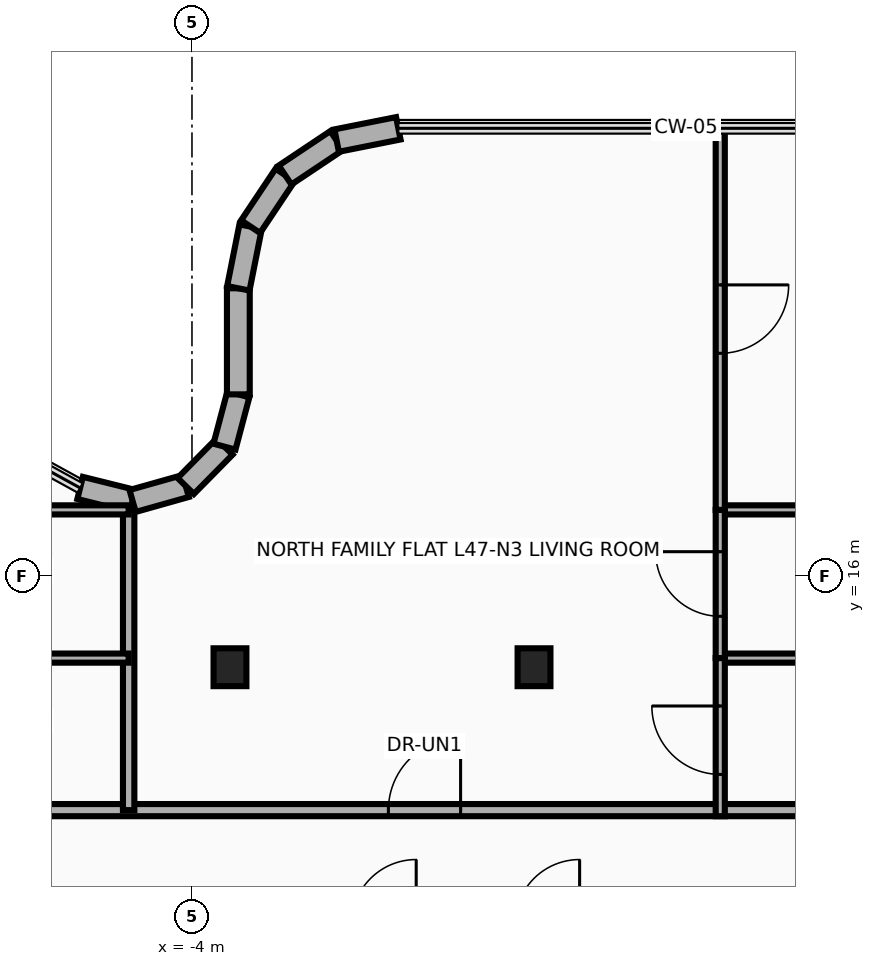
"""IFC4 building model, lengths in metres.
Left out: names, types, materials, properties, quantities, classifications, styles, units other than length and angle.
Written with IfcOpenShell. Run it as: python <this file> out.ifc"""

import sys

from ifc_helpers import new_model, si_unit, direction, frame, frame_2d, origin, origin_2d, place, context, subcontext, project, spatial, rectangle, i_section, extrude, source, transform, mapped, element, fill, save


model = new_model("IFC4")
c1 = context("Model", 3, precision=1e-05, world=origin(), true_north=direction((0.0, 1.0)))
c2 = subcontext(c1, "Body", "Model", "MODEL_VIEW")
j1 = project(units=[si_unit("LENGTHUNIT", "METRE"), si_unit("PLANEANGLEUNIT", "RADIAN")], contexts=[c1])
p1 = place(None, origin())
s1 = spatial("IfcSite", under=j1, at=p1, CompositionType="ELEMENT")
p2 = place(p1, origin())
s2 = spatial("IfcBuilding", under=s1, at=p2, CompositionType="ELEMENT")
p3 = place(p2, frame((0.0, 0.0, 184.45)))
s3 = spatial("IfcBuildingStorey", under=s2, at=p3, CompositionType="ELEMENT", Elevation=184.45)
m1 = source(origin(), c2, "Body", "SweptSolid", [
    extrude(i_section(OverallWidth=0.432, OverallDepth=0.498, WebThickness=0.056, FlangeThickness=0.089, at=origin_2d()), origin(), (0.0, 0.0, 1.0), 3.95),
])
for number, where, z_axis, x_axis in (
    (1, (-3.5, 14.8, 0.0), (0.0, 0.0, 1.0), (1.0, 0.0, 0.0)),
    (2, (0.5, 14.8, 0.0), (0.0, 0.0, 1.0), (1.0, 0.0, 0.0)),
):
    element("IfcColumn", number, at=place(p3, frame(where, z_axis=z_axis, x_axis=x_axis)), inside=s3, PredefinedType="COLUMN", context=c2, shape_type="MappedRepresentation", body=[
        mapped(m1, transform((0.0, 0.0, 0.0), x_axis=(1.0, 0.0, 0.0), y_axis=(0.0, 1.0, 0.0), z_axis=(0.0, 0.0, 1.0), scale=1.0)),
    ])
p4 = place(p3, frame((-5.472, 17.159, 0.0), z_axis=(0.0, 0.0, 1.0), x_axis=(0.970564820059, -0.240840050789, 0.0)))
e3 = element("IfcWall", 3, at=p4, inside=s3, PredefinedType="SOLIDWALL", context=c2, shape_type="SweptSolid", body=[
    extrude(rectangle(XDim=0.712, YDim=0.3, at=frame_2d((0.356, 0.0))), origin(), (0.0, 0.0, 1.0), 3.63),
])
p5 = place(p3, frame((-4.781, 16.987, 0.0), z_axis=(0.0, 0.0, 1.0), x_axis=(0.962494705656, 0.271300463662, 0.0)))
e4 = element("IfcWall", 4, at=p5, inside=s3, PredefinedType="SOLIDWALL", context=c2, shape_type="SweptSolid", body=[
    extrude(rectangle(XDim=0.726, YDim=0.3, at=frame_2d((0.363, 0.0))), origin(), (0.0, 0.0, 1.0), 3.63),
])
p6 = place(p3, frame((-4.082, 17.184, 0.0), z_axis=(0.0, 0.0, 1.0), x_axis=(0.701538604215, 0.712631452293, 0.0)))
e5 = element("IfcWall", 5, at=p6, inside=s3, PredefinedType="SOLIDWALL", context=c2, shape_type="SweptSolid", body=[
    extrude(rectangle(XDim=0.726, YDim=0.3, at=frame_2d((0.363, 0.0))), origin(), (0.0, 0.0, 1.0), 2.615),
])
p7 = place(p3, frame((-3.573, 17.702, 0.0), z_axis=(0.0, 0.0, 1.0), x_axis=(0.256637481794, 0.966507735581, 0.0)))
e6 = element("IfcWall", 6, at=p7, inside=s3, PredefinedType="SOLIDWALL", context=c2, shape_type="SweptSolid", body=[
    extrude(rectangle(XDim=0.712, YDim=0.3, at=frame_2d((0.356, 0.0))), origin(), (0.0, 0.0, 1.0), 2.615),
])
p8 = place(p3, frame((-3.39, 18.39, 0.0), z_axis=(0.0, 0.0, 1.0), x_axis=(0.0, 1.0, 0.0)))
e7 = element("IfcWall", 7, at=p8, inside=s3, PredefinedType="SOLIDWALL", context=c2, shape_type="SweptSolid", body=[
    extrude(rectangle(XDim=1.396, YDim=0.3, at=frame_2d((0.698, 0.0))), origin(), (0.0, 0.0, 1.0), 2.615),
])
p9 = place(p3, frame((-3.39, 19.785, 0.0), z_axis=(0.0, 0.0, 1.0), x_axis=(0.195094354541, 0.980784478276, 0.0)))
e8 = element("IfcWall", 8, at=p9, inside=s3, PredefinedType="SOLIDWALL", context=c2, shape_type="SweptSolid", body=[
    extrude(rectangle(XDim=0.827, YDim=0.3, at=frame_2d((0.414, 0.0))), origin(), (0.0, 0.0, 1.0), 2.615),
])
p10 = place(p3, frame((-3.229, 20.596, 0.0), z_axis=(0.0, 0.0, 1.0), x_axis=(0.55545926088, 0.831543750805, 0.0)))
e9 = element("IfcWall", 9, at=p10, inside=s3, PredefinedType="SOLIDWALL", context=c2, shape_type="SweptSolid", body=[
    extrude(rectangle(XDim=0.816, YDim=0.3, at=frame_2d((0.408, 0.0))), origin(), (0.0, 0.0, 1.0), 2.615),
])
p11 = place(p3, frame((-2.775, 21.275, 0.0), z_axis=(0.0, 0.0, 1.0), x_axis=(0.831543750805, 0.55545926088, 0.0)))
e10 = element("IfcWall", 10, at=p11, inside=s3, PredefinedType="SOLIDWALL", context=c2, shape_type="SweptSolid", body=[
    extrude(rectangle(XDim=0.816, YDim=0.3, at=frame_2d((0.408, 0.0))), origin(), (0.0, 0.0, 1.0), 3.63),
])
p12 = place(p3, frame((-2.096, 21.729, 0.0), z_axis=(0.0, 0.0, 1.0), x_axis=(0.980784478276, 0.195094354541, 0.0)))
e11 = element("IfcWall", 11, at=p12, inside=s3, PredefinedType="SOLIDWALL", context=c2, shape_type="SweptSolid", body=[
    extrude(rectangle(XDim=0.827, YDim=0.3, at=frame_2d((0.414, 0.0))), origin(), (0.0, 0.0, 1.0), 3.076),
])
p13 = place(p3, frame((-28.25, 12.92, 0.0), z_axis=(0.0, 0.0, 1.0), x_axis=(1.0, 0.0, 0.0)))
e12 = element("IfcWall", 12, at=p13, inside=s3, PredefinedType="PARTITIONING", context=c2, shape_type="SweptSolid", body=[
    extrude(rectangle(XDim=36.75, YDim=0.16, at=frame_2d((18.375, 0.0))), origin(), (0.0, 0.0, 1.0), 2.615),
])
p14 = place(p13, frame((0.973, 0.0, 0.0)))
e13 = element("IfcOpeningElement", 13, at=p14, cuts=e12, PredefinedType="OPENING", context=c2, shape_type="SweptSolid", body=[
    extrude(rectangle(XDim=0.95, YDim=2.15, at=frame_2d((0.475, 1.075))), frame((0.0, 0.095, 0.0), z_axis=(0.0, -1.0, 0.0), x_axis=(1.0, 0.0, 0.0)), (0.0, 0.0, 1.0), 0.19),
])
p15 = place(p13, frame((4.915, 0.0, 0.0)))
e14 = element("IfcOpeningElement", 14, at=p15, cuts=e12, PredefinedType="OPENING", context=c2, shape_type="SweptSolid", body=[
    extrude(rectangle(XDim=0.95, YDim=2.15, at=frame_2d((0.475, 1.075))), frame((0.0, 0.095, 0.0), z_axis=(0.0, -1.0, 0.0), x_axis=(1.0, 0.0, 0.0)), (0.0, 0.0, 1.0), 0.19),
])
p16 = place(p13, frame((13.5, 0.0, 0.0)))
e15 = element("IfcOpeningElement", 15, at=p16, cuts=e12, PredefinedType="OPENING", context=c2, shape_type="SweptSolid", body=[
    extrude(rectangle(XDim=0.95, YDim=2.15, at=frame_2d((0.475, 1.075))), frame((0.0, 0.095, 0.0), z_axis=(0.0, -1.0, 0.0), x_axis=(1.0, 0.0, 0.0)), (0.0, 0.0, 1.0), 0.19),
])
p17 = place(p13, frame((26.834, 0.0, 0.0)))
e16 = element("IfcOpeningElement", 16, at=p17, cuts=e12, PredefinedType="OPENING", context=c2, shape_type="SweptSolid", body=[
    extrude(rectangle(XDim=0.95, YDim=2.15, at=frame_2d((0.475, 1.075))), frame((0.0, 0.095, 0.0), z_axis=(0.0, -1.0, 0.0), x_axis=(1.0, 0.0, 0.0)), (0.0, 0.0, 1.0), 0.19),
])
p18 = place(p3, frame((-4.833, 12.92, 0.0), z_axis=(0.0, 0.0, 1.0), x_axis=(0.0, 1.0, 0.0)))
e17 = element("IfcWall", 17, at=p18, inside=s3, PredefinedType="PARTITIONING", context=c2, shape_type="SweptSolid", body=[
    extrude(rectangle(XDim=3.951, YDim=0.15, at=frame_2d((1.976, 0.0))), origin(), (0.0, 0.0, 1.0), 2.415),
])
p19 = place(p3, frame((-10.383, 14.92, 0.0), z_axis=(0.0, 0.0, 1.0), x_axis=(1.0, 0.0, 0.0)))
e18 = element("IfcWall", 18, at=p19, inside=s3, PredefinedType="PARTITIONING", context=c2, shape_type="SweptSolid", body=[
    extrude(rectangle(XDim=5.55, YDim=0.12, at=frame_2d((2.775, 0.0))), origin(), (0.0, 0.0, 1.0), 2.415),
])
p20 = place(p3, frame((-10.383, 16.87, 0.0), z_axis=(0.0, 0.0, 1.0), x_axis=(1.0, 0.0, 0.0)))
e19 = element("IfcWall", 19, at=p20, inside=s3, PredefinedType="PARTITIONING", context=c2, shape_type="SweptSolid", body=[
    extrude(rectangle(XDim=5.55, YDim=0.12, at=frame_2d((2.775, 0.0))), origin(), (0.0, 0.0, 1.0), 3.63),
])
for number, where, z_axis, x_axis in (
    (20, (2.95, 14.92, 0.0), (0.0, 0.0, 1.0), (1.0, 0.0, 0.0)),
    (21, (2.95, 16.87, 0.0), (0.0, 0.0, 1.0), (1.0, 0.0, 0.0)),
):
    element("IfcWall", number, at=place(p3, frame(where, z_axis=z_axis, x_axis=x_axis)), inside=s3, PredefinedType="PARTITIONING", context=c2, shape_type="SweptSolid", body=[
        extrude(rectangle(XDim=5.55, YDim=0.12, at=frame_2d((2.775, 0.0))), origin(), (0.0, 0.0, 1.0), 2.615),
    ])
p21 = place(p3, frame((2.95, 14.92, 0.0), z_axis=(0.0, 0.0, 1.0), x_axis=(0.0, 1.0, 0.0)))
e22 = element("IfcWall", 22, at=p21, inside=s3, PredefinedType="PARTITIONING", context=c2, shape_type="SweptSolid", body=[
    extrude(rectangle(XDim=1.95, YDim=0.12, at=frame_2d((0.975, 0.0))), origin(), (0.0, 0.0, 1.0), 2.665),
])
p22 = place(p21, frame((0.55, 0.0, 0.0)))
e23 = element("IfcOpeningElement", 23, at=p22, cuts=e22, PredefinedType="OPENING", context=c2, shape_type="SweptSolid", body=[
    extrude(rectangle(XDim=0.85, YDim=2.1, at=frame_2d((0.425, 1.05))), frame((0.0, 0.075, 0.0), z_axis=(0.0, -1.0, 0.0), x_axis=(1.0, 0.0, 0.0)), (0.0, 0.0, 1.0), 0.15),
])
p23 = place(p3, frame((2.95, 12.84, 0.0), z_axis=(0.0, 0.0, 1.0), x_axis=(0.0, 1.0, 0.0)))
e24 = element("IfcWall", 24, at=p23, inside=s3, PredefinedType="PARTITIONING", context=c2, shape_type="SweptSolid", body=[
    extrude(rectangle(XDim=2.08, YDim=0.12, at=frame_2d((1.04, 0.0))), origin(), (0.0, 0.0, 1.0), 2.665),
])
p24 = place(p23, frame((0.55, 0.0, 0.0)))
e25 = element("IfcOpeningElement", 25, at=p24, cuts=e24, PredefinedType="OPENING", context=c2, shape_type="SweptSolid", body=[
    extrude(rectangle(XDim=0.9, YDim=2.1, at=frame_2d((0.45, 1.05))), frame((0.0, 0.075, 0.0), z_axis=(0.0, -1.0, 0.0), x_axis=(1.0, 0.0, 0.0)), (0.0, 0.0, 1.0), 0.15),
])
p25 = place(p3, frame((2.95, 16.87, 0.0), z_axis=(0.0, 0.0, 1.0), x_axis=(0.0, 1.0, 0.0)))
e26 = element("IfcWall", 26, at=p25, inside=s3, PredefinedType="PARTITIONING", context=c2, shape_type="SweptSolid", body=[
    extrude(rectangle(XDim=5.02, YDim=0.12, at=frame_2d((2.51, 0.0))), origin(), (0.0, 0.0, 1.0), 3.076),
])
p26 = place(p25, frame((2.06, 0.0, 0.0)))
e27 = element("IfcOpeningElement", 27, at=p26, cuts=e26, PredefinedType="OPENING", context=c2, shape_type="SweptSolid", body=[
    extrude(rectangle(XDim=0.9, YDim=2.1, at=frame_2d((0.45, 1.05))), frame((0.0, 0.075, 0.0), z_axis=(0.0, -1.0, 0.0), x_axis=(1.0, 0.0, 0.0)), (0.0, 0.0, 1.0), 0.15),
])
p27 = place(p17, origin())
e28 = element("IfcDoor", 28, at=p27, inside=s3, OperationType="SINGLE_SWING_RIGHT", PredefinedType="DOOR", context=c2, shape_type="SweptSolid", body=[
    extrude(rectangle(XDim=0.95, YDim=2.15, at=frame_2d((0.475, 1.075))), frame((0.0, 0.025, 0.0), z_axis=(0.0, -1.0, 0.0), x_axis=(1.0, 0.0, 0.0)), (0.0, 0.0, 1.0), 0.05),
])
fill(e16, e28)
p28 = place(p22, origin())
e29 = element("IfcDoor", 29, at=p28, inside=s3, OperationType="SINGLE_SWING_LEFT", PredefinedType="DOOR", context=c2, shape_type="SweptSolid", body=[
    extrude(rectangle(XDim=0.85, YDim=2.1, at=frame_2d((0.425, 1.05))), frame((0.0, 0.025, 0.0), z_axis=(0.0, -1.0, 0.0), x_axis=(1.0, 0.0, 0.0)), (0.0, 0.0, 1.0), 0.05),
])
fill(e23, e29)
p29 = place(p24, origin())
e30 = element("IfcDoor", 30, at=p29, inside=s3, OperationType="SINGLE_SWING_RIGHT", PredefinedType="DOOR", context=c2, shape_type="SweptSolid", body=[
    extrude(rectangle(XDim=0.9, YDim=2.1, at=frame_2d((0.45, 1.05))), frame((0.0, 0.025, 0.0), z_axis=(0.0, -1.0, 0.0), x_axis=(1.0, 0.0, 0.0)), (0.0, 0.0, 1.0), 0.05),
])
fill(e25, e30)
p30 = place(p26, frame((0.9, 0.0, 0.0), z_axis=(0.0, 0.0, 1.0), x_axis=(-1.0, 0.0, 0.0)))
e31 = element("IfcDoor", 31, at=p30, inside=s3, OperationType="SINGLE_SWING_LEFT", PredefinedType="DOOR", context=c2, shape_type="SweptSolid", body=[
    extrude(rectangle(XDim=0.9, YDim=2.1, at=frame_2d((0.45, 1.05))), frame((0.0, 0.025, 0.0), z_axis=(0.0, -1.0, 0.0), x_axis=(1.0, 0.0, 0.0)), (0.0, 0.0, 1.0), 0.05),
])
fill(e27, e31)
save(model, sys.argv[1])
